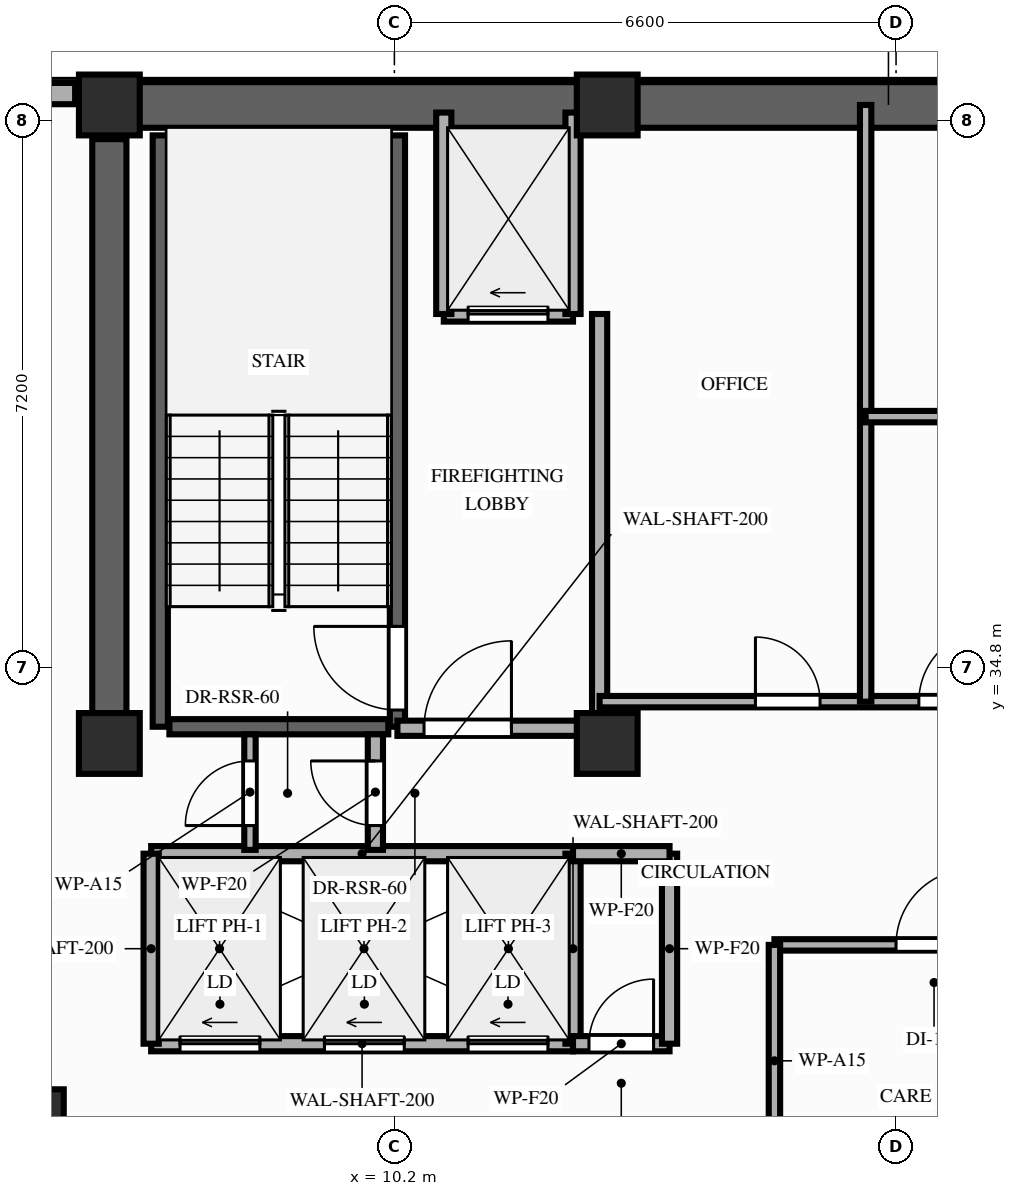
"""IFC4 building model, lengths in metres.
Left out: names, types, materials, properties, quantities, classifications, styles, units other than length and angle.
Written with IfcOpenShell. Run it as: python <this file> out.ifc"""

import sys

from ifc_helpers import new_model, si_unit, direction, frame, frame_2d, origin, origin_2d, place, context, subcontext, project, spatial, rectangle, extrude, element, fill, save


model = new_model("IFC4")
c1 = context("Model", 3, precision=1e-05, world=origin(), true_north=direction((0.0, 1.0)))
c2 = subcontext(c1, "Body", "Model", "MODEL_VIEW")
j1 = project(units=[si_unit("LENGTHUNIT", "METRE"), si_unit("PLANEANGLEUNIT", "RADIAN")], contexts=[c1])
p1 = place(None, origin())
s1 = spatial("IfcSite", under=j1, at=p1, CompositionType="ELEMENT")
p2 = place(p1, origin())
s2 = spatial("IfcBuilding", under=s1, at=p2, CompositionType="ELEMENT")
p3 = place(p2, frame((0.0, 0.0, 211.2)))
s3 = spatial("IfcBuildingStorey", under=s2, at=p3, CompositionType="ELEMENT", Elevation=211.2)
for number, where, z_axis, x_axis in (
    (1, (6.45, 33.8, 0.0), (0.0, 0.0, 1.0), (1.0, 0.0, 0.0)),
    (2, (13.0, 33.8, 0.0), (0.0, 0.0, 1.0), (1.0, 0.0, 0.0)),
    (3, (6.45, 42.2, 0.0), (0.0, 0.0, 1.0), (1.0, 0.0, 0.0)),
    (4, (13.0, 42.2, 0.0), (0.0, 0.0, 1.0), (1.0, 0.0, 0.0)),
):
    element("IfcColumn", number, at=place(p3, frame(where, z_axis=z_axis, x_axis=x_axis)), inside=s3, PredefinedType="COLUMN", context=c2, shape_type="SweptSolid", body=[
        extrude(rectangle(XDim=0.8, YDim=0.8, at=origin_2d()), origin(), (0.0, 0.0, 1.0), 3.2),
    ])
p4 = place(p3, frame((5.4, 28.8, 0.0), z_axis=(0.0, 0.0, 1.0), x_axis=(1.0, 0.0, 0.0)))
e5 = element("IfcColumn", 5, at=p4, inside=s3, PredefinedType="COLUMN", context=c2, shape_type="SweptSolid", body=[
    extrude(rectangle(XDim=0.9, YDim=0.9, at=origin_2d()), origin(), (0.0, 0.0, 1.0), 3.2),
])
p5 = place(p3, frame((6.0, 42.35, 0.0), z_axis=(0.0, 0.0, 1.0), x_axis=(-1.0, 0.0, 0.0)))
e6 = element("IfcWall", 6, at=p5, inside=s3, PredefinedType="STANDARD", context=c2, shape_type="SweptSolid", body=[
    extrude(rectangle(XDim=2.0, YDim=0.28, at=frame_2d((1.0, 0.0))), origin(), (0.0, 0.0, 1.0), 2.96),
])
p6 = place(p3, frame((6.45, 42.2, 0.0), z_axis=(0.0, 0.0, 1.0), x_axis=(1.0, 0.0, 0.0)))
e7 = element("IfcWall", 7, at=p6, inside=s3, PredefinedType="SHEAR", context=c2, shape_type="SweptSolid", body=[
    extrude(rectangle(XDim=20.45, YDim=0.6, at=frame_2d((10.225, 0.0))), origin(), (0.0, 0.0, 1.0), 2.96),
])
p7 = place(p3, frame((6.45, 33.8, 0.0), z_axis=(0.0, 0.0, 1.0), x_axis=(0.0, 1.0, 0.0)))
e8 = element("IfcWall", 8, at=p7, inside=s3, PredefinedType="SHEAR", context=c2, shape_type="SweptSolid", body=[
    extrude(rectangle(XDim=7.95, YDim=0.45, at=frame_2d((3.975, 0.0))), origin(), (0.0, 0.0, 1.0), 2.96),
])
p8 = place(p3, frame((7.12, 34.02, 0.0), z_axis=(0.0, 0.0, 1.0), x_axis=(0.0, 1.0, 0.0)))
e9 = element("IfcWall", 9, at=p8, inside=s3, PredefinedType="SHEAR", context=c2, shape_type="SweptSolid", body=[
    extrude(rectangle(XDim=7.78, YDim=0.2, at=frame_2d((3.89, 0.0))), origin(), (0.0, 0.0, 1.0), 2.96),
])
p9 = place(p3, frame((10.24, 34.02, 0.0), z_axis=(0.0, 0.0, 1.0), x_axis=(0.0, 1.0, 0.0)))
e10 = element("IfcWall", 10, at=p9, inside=s3, PredefinedType="SHEAR", context=c2, shape_type="SweptSolid", body=[
    extrude(rectangle(XDim=7.78, YDim=0.2, at=frame_2d((3.89, 0.0))), origin(), (0.0, 0.0, 1.0), 2.96),
])
p10 = place(p9, frame((0.22, 0.0, 0.0)))
e11 = element("IfcOpeningElement", 11, at=p10, cuts=e10, PredefinedType="OPENING", context=c2, shape_type="SweptSolid", body=[
    extrude(rectangle(XDim=1.1, YDim=2.15, at=frame_2d((0.55, 1.075))), frame((0.0, 0.11, 0.0), z_axis=(0.0, -1.0, 0.0), x_axis=(1.0, 0.0, 0.0)), (0.0, 0.0, 1.0), 0.22),
])
p11 = place(p3, frame((7.24, 34.02, 0.0), z_axis=(0.0, 0.0, 1.0), x_axis=(1.0, 0.0, 0.0)))
e12 = element("IfcWall", 12, at=p11, inside=s3, PredefinedType="SHEAR", context=c2, shape_type="SweptSolid", body=[
    extrude(rectangle(XDim=2.88, YDim=0.2, at=frame_2d((1.44, 0.0))), origin(), (0.0, 0.0, 1.0), 2.96),
])
p12 = place(p3, frame((7.0, 29.85, 0.0), z_axis=(0.0, 0.0, 1.0), x_axis=(1.0, 0.0, 0.0)))
e13 = element("IfcWall", 13, at=p12, inside=s3, PredefinedType="MOVABLE", context=c2, shape_type="SweptSolid", body=[
    extrude(rectangle(XDim=5.55, YDim=0.2, at=frame_2d((2.775, 0.0))), origin(), (0.0, 0.0, 1.0), 2.96),
])
p13 = place(p12, frame((0.38, 0.0, 0.0)))
e14 = element("IfcOpeningElement", 14, at=p13, cuts=e13, PredefinedType="OPENING", context=c2, shape_type="SweptSolid", body=[
    extrude(rectangle(XDim=1.05, YDim=2.15, at=frame_2d((0.525, 1.075))), frame((0.0, 0.11, 0.0), z_axis=(0.0, -1.0, 0.0), x_axis=(1.0, 0.0, 0.0)), (0.0, 0.0, 1.0), 0.22),
])
p14 = place(p12, frame((2.28, 0.0, 0.0)))
e15 = element("IfcOpeningElement", 15, at=p14, cuts=e13, PredefinedType="OPENING", context=c2, shape_type="SweptSolid", body=[
    extrude(rectangle(XDim=1.05, YDim=2.15, at=frame_2d((0.525, 1.075))), frame((0.0, 0.11, 0.0), z_axis=(0.0, -1.0, 0.0), x_axis=(1.0, 0.0, 0.0)), (0.0, 0.0, 1.0), 0.22),
])
p15 = place(p12, frame((4.17, 0.0, 0.0)))
e16 = element("IfcOpeningElement", 16, at=p15, cuts=e13, PredefinedType="OPENING", context=c2, shape_type="SweptSolid", body=[
    extrude(rectangle(XDim=1.05, YDim=2.15, at=frame_2d((0.525, 1.075))), frame((0.0, 0.11, 0.0), z_axis=(0.0, -1.0, 0.0), x_axis=(1.0, 0.0, 0.0)), (0.0, 0.0, 1.0), 0.22),
])
p16 = place(p3, frame((7.0, 32.35, 0.0), z_axis=(0.0, 0.0, 1.0), x_axis=(1.0, 0.0, 0.0)))
e17 = element("IfcWall", 17, at=p16, inside=s3, PredefinedType="MOVABLE", context=c2, shape_type="SweptSolid", body=[
    extrude(rectangle(XDim=5.55, YDim=0.2, at=frame_2d((2.775, 0.0))), origin(), (0.0, 0.0, 1.0), 2.96),
])
for number, where, z_axis, x_axis in (
    (18, (7.0, 29.85, 0.0), (0.0, 0.0, 1.0), (0.0, 1.0, 0.0)),
    (19, (12.55, 29.85, 0.0), (0.0, 0.0, 1.0), (0.0, 1.0, 0.0)),
):
    element("IfcWall", number, at=place(p3, frame(where, z_axis=z_axis, x_axis=x_axis)), inside=s3, PredefinedType="MOVABLE", context=c2, shape_type="SweptSolid", body=[
        extrude(rectangle(XDim=2.5, YDim=0.2, at=frame_2d((1.25, 0.0))), origin(), (0.0, 0.0, 1.0), 2.96),
    ])
p17 = place(p3, frame((10.85, 39.45, 0.0), z_axis=(0.0, 0.0, 1.0), x_axis=(1.0, 0.0, 0.0)))
e20 = element("IfcWall", 20, at=p17, inside=s3, PredefinedType="MOVABLE", context=c2, shape_type="SweptSolid", body=[
    extrude(rectangle(XDim=1.7, YDim=0.2, at=frame_2d((0.85, 0.0))), origin(), (0.0, 0.0, 1.0), 2.96),
])
p18 = place(p17, frame((0.32, 0.0, 0.0)))
e21 = element("IfcOpeningElement", 21, at=p18, cuts=e20, PredefinedType="OPENING", context=c2, shape_type="SweptSolid", body=[
    extrude(rectangle(XDim=1.05, YDim=2.15, at=frame_2d((0.525, 1.075))), frame((0.0, 0.11, 0.0), z_axis=(0.0, -1.0, 0.0), x_axis=(1.0, 0.0, 0.0)), (0.0, 0.0, 1.0), 0.22),
])
for number, where, z_axis, x_axis in (
    (22, (10.85, 39.45, 0.0), (0.0, 0.0, 1.0), (0.0, 1.0, 0.0)),
    (23, (12.55, 39.45, 0.0), (0.0, 0.0, 1.0), (0.0, 1.0, 0.0)),
):
    element("IfcWall", number, at=place(p3, frame(where, z_axis=z_axis, x_axis=x_axis)), inside=s3, PredefinedType="MOVABLE", context=c2, shape_type="SweptSolid", body=[
        extrude(rectangle(XDim=2.65, YDim=0.2, at=frame_2d((1.325, 0.0))), origin(), (0.0, 0.0, 1.0), 2.45),
    ])
p19 = place(p3, frame((12.9, 34.0, 0.0), z_axis=(0.0, 0.0, 1.0), x_axis=(0.0, 1.0, 0.0)))
e24 = element("IfcWall", 24, at=p19, inside=s3, PredefinedType="PARTITIONING", context=c2, shape_type="SweptSolid", body=[
    extrude(rectangle(XDim=5.45, YDim=0.2, at=frame_2d((2.725, 0.0))), origin(), (0.0, 0.0, 1.0), 2.45),
])
p20 = place(p3, frame((10.24, 34.0, 0.0), z_axis=(0.0, 0.0, 1.0), x_axis=(1.0, 0.0, 0.0)))
e25 = element("IfcWall", 25, at=p20, inside=s3, PredefinedType="PARTITIONING", context=c2, shape_type="SweptSolid", body=[
    extrude(rectangle(XDim=2.66, YDim=0.2, at=frame_2d((1.33, 0.0))), origin(), (0.0, 0.0, 1.0), 2.45),
])
p21 = place(p20, frame((0.35, 0.0, 0.0)))
e26 = element("IfcOpeningElement", 26, at=p21, cuts=e25, PredefinedType="OPENING", context=c2, shape_type="SweptSolid", body=[
    extrude(rectangle(XDim=1.15, YDim=2.15, at=frame_2d((0.575, 1.075))), frame((0.0, 0.11, 0.0), z_axis=(0.0, -1.0, 0.0), x_axis=(1.0, 0.0, 0.0)), (0.0, 0.0, 1.0), 0.22),
])
p22 = place(p3, frame((9.95, 32.4, 0.0), z_axis=(0.0, 0.0, 1.0), x_axis=(0.0, 1.0, 0.0)))
e27 = element("IfcWall", 27, at=p22, inside=s3, PredefinedType="PARTITIONING", context=c2, shape_type="SweptSolid", body=[
    extrude(rectangle(XDim=1.52, YDim=0.2, at=frame_2d((0.76, 0.0))), origin(), (0.0, 0.0, 1.0), 2.45),
])
p23 = place(p22, frame((0.32, 0.0, 0.0)))
e28 = element("IfcOpeningElement", 28, at=p23, cuts=e27, PredefinedType="OPENING", context=c2, shape_type="SweptSolid", body=[
    extrude(rectangle(XDim=0.85, YDim=2.05, at=frame_2d((0.425, 1.025))), frame((0.0, 0.11, 0.0), z_axis=(0.0, -1.0, 0.0), x_axis=(1.0, 0.0, 0.0)), (0.0, 0.0, 1.0), 0.22),
])
p24 = place(p3, frame((8.3, 32.4, 0.0), z_axis=(0.0, 0.0, 1.0), x_axis=(0.0, 1.0, 0.0)))
e29 = element("IfcWall", 29, at=p24, inside=s3, PredefinedType="PARTITIONING", context=c2, shape_type="SweptSolid", body=[
    extrude(rectangle(XDim=1.52, YDim=0.15, at=frame_2d((0.76, 0.0))), origin(), (0.0, 0.0, 1.0), 2.45),
])
p25 = place(p24, frame((0.32, 0.0, 0.0)))
e30 = element("IfcOpeningElement", 30, at=p25, cuts=e29, PredefinedType="OPENING", context=c2, shape_type="SweptSolid", body=[
    extrude(rectangle(XDim=0.85, YDim=2.05, at=frame_2d((0.425, 1.025))), frame((0.0, 0.085, 0.0), z_axis=(0.0, -1.0, 0.0), x_axis=(1.0, 0.0, 0.0)), (0.0, 0.0, 1.0), 0.17),
])
p26 = place(p3, frame((12.55, 29.85, 0.0), z_axis=(0.0, 0.0, 1.0), x_axis=(1.0, 0.0, 0.0)))
e31 = element("IfcWall", 31, at=p26, inside=s3, PredefinedType="PARTITIONING", context=c2, shape_type="SweptSolid", body=[
    extrude(rectangle(XDim=1.27, YDim=0.2, at=frame_2d((0.635, 0.0))), origin(), (0.0, 0.0, 1.0), 2.96),
])
p27 = place(p26, frame((0.21, 0.0, 0.0)))
e32 = element("IfcOpeningElement", 32, at=p27, cuts=e31, PredefinedType="OPENING", context=c2, shape_type="SweptSolid", body=[
    extrude(rectangle(XDim=0.85, YDim=2.05, at=frame_2d((0.425, 1.025))), frame((0.0, 0.11, 0.0), z_axis=(0.0, -1.0, 0.0), x_axis=(1.0, 0.0, 0.0)), (0.0, 0.0, 1.0), 0.22),
])
p28 = place(p3, frame((13.82, 29.85, 0.0), z_axis=(0.0, 0.0, 1.0), x_axis=(0.0, 1.0, 0.0)))
e33 = element("IfcWall", 33, at=p28, inside=s3, PredefinedType="PARTITIONING", context=c2, shape_type="SweptSolid", body=[
    extrude(rectangle(XDim=2.5, YDim=0.2, at=frame_2d((1.25, 0.0))), origin(), (0.0, 0.0, 1.0), 2.96),
])
p29 = place(p3, frame((12.55, 32.35, 0.0), z_axis=(0.0, 0.0, 1.0), x_axis=(1.0, 0.0, 0.0)))
e34 = element("IfcWall", 34, at=p29, inside=s3, PredefinedType="PARTITIONING", context=c2, shape_type="SweptSolid", body=[
    extrude(rectangle(XDim=1.27, YDim=0.2, at=frame_2d((0.635, 0.0))), origin(), (0.0, 0.0, 1.0), 2.96),
])
p30 = place(p3, frame((12.9, 34.35, 0.0), z_axis=(0.0, 0.0, 1.0), x_axis=(1.0, 0.0, 0.0)))
e35 = element("IfcWall", 35, at=p30, inside=s3, PredefinedType="PARTITIONING", context=c2, shape_type="SweptSolid", body=[
    extrude(rectangle(XDim=7.6, YDim=0.15, at=frame_2d((3.8, 0.0))), origin(), (0.0, 0.0, 1.0), 2.96),
])
p31 = place(p30, frame((2.05, 0.0, 0.0)))
e36 = element("IfcOpeningElement", 36, at=p31, cuts=e35, PredefinedType="OPENING", context=c2, shape_type="SweptSolid", body=[
    extrude(rectangle(XDim=0.85, YDim=2.05, at=frame_2d((0.425, 1.025))), frame((0.0, 0.085, 0.0), z_axis=(0.0, -1.0, 0.0), x_axis=(1.0, 0.0, 0.0)), (0.0, 0.0, 1.0), 0.17),
])
p32 = place(p30, frame((4.2, 0.0, 0.0)))
e37 = element("IfcOpeningElement", 37, at=p32, cuts=e35, PredefinedType="OPENING", context=c2, shape_type="SweptSolid", body=[
    extrude(rectangle(XDim=0.95, YDim=2.15, at=frame_2d((0.475, 1.075))), frame((0.0, 0.085, 0.0), z_axis=(0.0, -1.0, 0.0), x_axis=(1.0, 0.0, 0.0)), (0.0, 0.0, 1.0), 0.17),
])
p33 = place(p3, frame((16.4, 34.35, 0.0), z_axis=(0.0, 0.0, 1.0), x_axis=(0.0, 1.0, 0.0)))
e38 = element("IfcWall", 38, at=p33, inside=s3, PredefinedType="PARTITIONING", context=c2, shape_type="SweptSolid", body=[
    extrude(rectangle(XDim=7.85, YDim=0.15, at=frame_2d((3.925, 0.0))), origin(), (0.0, 0.0, 1.0), 2.45),
])
p34 = place(p3, frame((16.4, 38.1, 0.0), z_axis=(0.0, 0.0, 1.0), x_axis=(1.0, 0.0, 0.0)))
e39 = element("IfcWall", 39, at=p34, inside=s3, PredefinedType="PARTITIONING", context=c2, shape_type="SweptSolid", body=[
    extrude(rectangle(XDim=4.05, YDim=0.15, at=frame_2d((2.025, 0.0))), origin(), (0.0, 0.0, 1.0), 2.96),
])
p35 = place(p34, frame((1.6, 0.0, 0.0)))
e40 = element("IfcOpeningElement", 40, at=p35, cuts=e39, PredefinedType="OPENING", context=c2, shape_type="SweptSolid", body=[
    extrude(rectangle(XDim=0.85, YDim=2.05, at=frame_2d((0.425, 1.025))), frame((0.0, 0.085, 0.0), z_axis=(0.0, -1.0, 0.0), x_axis=(1.0, 0.0, 0.0)), (0.0, 0.0, 1.0), 0.17),
])
p36 = place(p3, frame((15.2, 31.15, 0.0), z_axis=(0.0, 0.0, 1.0), x_axis=(1.0, 0.0, 0.0)))
e41 = element("IfcWall", 41, at=p36, inside=s3, PredefinedType="PARTITIONING", context=c2, shape_type="SweptSolid", body=[
    extrude(rectangle(XDim=4.7, YDim=0.15, at=frame_2d((2.35, 0.0))), origin(), (0.0, 0.0, 1.0), 2.45),
])
p37 = place(p36, frame((1.6, 0.0, 0.0)))
e42 = element("IfcOpeningElement", 42, at=p37, cuts=e41, PredefinedType="OPENING", context=c2, shape_type="SweptSolid", body=[
    extrude(rectangle(XDim=1.0, YDim=2.15, at=frame_2d((0.5, 1.075))), frame((0.0, 0.085, 0.0), z_axis=(0.0, -1.0, 0.0), x_axis=(1.0, 0.0, 0.0)), (0.0, 0.0, 1.0), 0.17),
])
p38 = place(p3, frame((15.2, 28.1, 0.0), z_axis=(0.0, 0.0, 1.0), x_axis=(0.0, 1.0, 0.0)))
e43 = element("IfcWall", 43, at=p38, inside=s3, PredefinedType="PARTITIONING", context=c2, shape_type="SweptSolid", body=[
    extrude(rectangle(XDim=3.05, YDim=0.15, at=frame_2d((1.525, 0.0))), origin(), (0.0, 0.0, 1.0), 2.45),
])
p39 = place(p10, origin())
e44 = element("IfcDoor", 44, at=p39, inside=s3, OperationType="SINGLE_SWING_RIGHT", PredefinedType="DOOR", context=c2, shape_type="SweptSolid", body=[
    extrude(rectangle(XDim=1.1, YDim=2.15, at=frame_2d((0.55, 1.075))), frame((0.0, 0.025, 0.0), z_axis=(0.0, -1.0, 0.0), x_axis=(1.0, 0.0, 0.0)), (0.0, 0.0, 1.0), 0.05),
])
fill(e11, e44)
p40 = place(p13, origin())
e45 = element("IfcDoor", 45, at=p40, inside=s3, OperationType="SLIDING_TO_LEFT", PredefinedType="DOOR", context=c2, shape_type="SweptSolid", body=[
    extrude(rectangle(XDim=1.05, YDim=2.15, at=frame_2d((0.525, 1.075))), frame((0.0, 0.025, 0.0), z_axis=(0.0, -1.0, 0.0), x_axis=(1.0, 0.0, 0.0)), (0.0, 0.0, 1.0), 0.05),
])
fill(e14, e45)
p41 = place(p14, origin())
e46 = element("IfcDoor", 46, at=p41, inside=s3, OperationType="SLIDING_TO_LEFT", PredefinedType="DOOR", context=c2, shape_type="SweptSolid", body=[
    extrude(rectangle(XDim=1.05, YDim=2.15, at=frame_2d((0.525, 1.075))), frame((0.0, 0.025, 0.0), z_axis=(0.0, -1.0, 0.0), x_axis=(1.0, 0.0, 0.0)), (0.0, 0.0, 1.0), 0.05),
])
fill(e15, e46)
p42 = place(p15, origin())
e47 = element("IfcDoor", 47, at=p42, inside=s3, OperationType="SLIDING_TO_LEFT", PredefinedType="DOOR", context=c2, shape_type="SweptSolid", body=[
    extrude(rectangle(XDim=1.05, YDim=2.15, at=frame_2d((0.525, 1.075))), frame((0.0, 0.025, 0.0), z_axis=(0.0, -1.0, 0.0), x_axis=(1.0, 0.0, 0.0)), (0.0, 0.0, 1.0), 0.05),
])
fill(e16, e47)
p43 = place(p18, origin())
e48 = element("IfcDoor", 48, at=p43, inside=s3, OperationType="SLIDING_TO_LEFT", PredefinedType="DOOR", context=c2, shape_type="SweptSolid", body=[
    extrude(rectangle(XDim=1.05, YDim=2.15, at=frame_2d((0.525, 1.075))), frame((0.0, 0.025, 0.0), z_axis=(0.0, -1.0, 0.0), x_axis=(1.0, 0.0, 0.0)), (0.0, 0.0, 1.0), 0.05),
])
fill(e21, e48)
p44 = place(p21, origin())
e49 = element("IfcDoor", 49, at=p44, inside=s3, OperationType="SINGLE_SWING_RIGHT", PredefinedType="DOOR", context=c2, shape_type="SweptSolid", body=[
    extrude(rectangle(XDim=1.15, YDim=2.15, at=frame_2d((0.575, 1.075))), frame((0.0, 0.025, 0.0), z_axis=(0.0, -1.0, 0.0), x_axis=(1.0, 0.0, 0.0)), (0.0, 0.0, 1.0), 0.05),
])
fill(e26, e49)
p45 = place(p23, origin())
e50 = element("IfcDoor", 50, at=p45, inside=s3, OperationType="SINGLE_SWING_RIGHT", PredefinedType="DOOR", context=c2, shape_type="SweptSolid", body=[
    extrude(rectangle(XDim=0.85, YDim=2.05, at=frame_2d((0.425, 1.025))), frame((0.0, 0.025, 0.0), z_axis=(0.0, -1.0, 0.0), x_axis=(1.0, 0.0, 0.0)), (0.0, 0.0, 1.0), 0.05),
])
fill(e28, e50)
p46 = place(p25, origin())
e51 = element("IfcDoor", 51, at=p46, inside=s3, OperationType="SINGLE_SWING_LEFT", PredefinedType="DOOR", context=c2, shape_type="SweptSolid", body=[
    extrude(rectangle(XDim=0.85, YDim=2.05, at=frame_2d((0.425, 1.025))), frame((0.0, 0.025, 0.0), z_axis=(0.0, -1.0, 0.0), x_axis=(1.0, 0.0, 0.0)), (0.0, 0.0, 1.0), 0.05),
])
fill(e30, e51)
p47 = place(p27, origin())
e52 = element("IfcDoor", 52, at=p47, inside=s3, OperationType="SINGLE_SWING_RIGHT", PredefinedType="DOOR", context=c2, shape_type="SweptSolid", body=[
    extrude(rectangle(XDim=0.85, YDim=2.05, at=frame_2d((0.425, 1.025))), frame((0.0, 0.025, 0.0), z_axis=(0.0, -1.0, 0.0), x_axis=(1.0, 0.0, 0.0)), (0.0, 0.0, 1.0), 0.05),
])
fill(e32, e52)
p48 = place(p31, origin())
e53 = element("IfcDoor", 53, at=p48, inside=s3, OperationType="SINGLE_SWING_LEFT", PredefinedType="DOOR", context=c2, shape_type="SweptSolid", body=[
    extrude(rectangle(XDim=0.85, YDim=2.05, at=frame_2d((0.425, 1.025))), frame((0.0, 0.025, 0.0), z_axis=(0.0, -1.0, 0.0), x_axis=(1.0, 0.0, 0.0)), (0.0, 0.0, 1.0), 0.05),
])
fill(e36, e53)
p49 = place(p32, origin())
e54 = element("IfcDoor", 54, at=p49, inside=s3, OperationType="SINGLE_SWING_RIGHT", PredefinedType="DOOR", context=c2, shape_type="SweptSolid", body=[
    extrude(rectangle(XDim=0.95, YDim=2.15, at=frame_2d((0.475, 1.075))), frame((0.0, 0.025, 0.0), z_axis=(0.0, -1.0, 0.0), x_axis=(1.0, 0.0, 0.0)), (0.0, 0.0, 1.0), 0.05),
])
fill(e37, e54)
p50 = place(p37, origin())
e55 = element("IfcDoor", 55, at=p50, inside=s3, OperationType="SINGLE_SWING_RIGHT", PredefinedType="DOOR", context=c2, shape_type="SweptSolid", body=[
    extrude(rectangle(XDim=1.0, YDim=2.15, at=frame_2d((0.5, 1.075))), frame((0.0, 0.025, 0.0), z_axis=(0.0, -1.0, 0.0), x_axis=(1.0, 0.0, 0.0)), (0.0, 0.0, 1.0), 0.05),
])
fill(e42, e55)
save(model, sys.argv[1])
